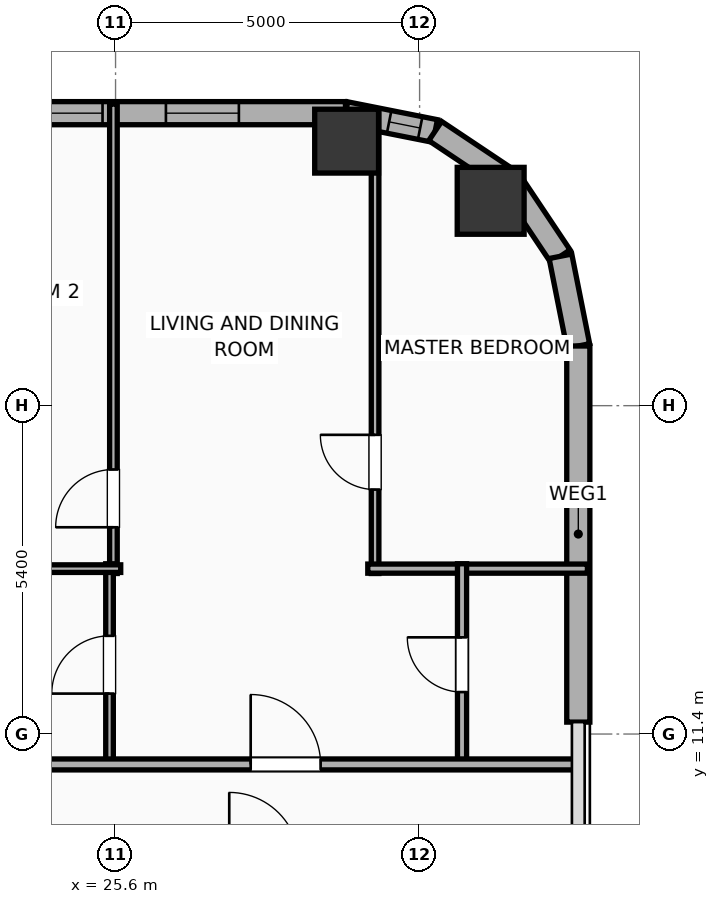
"""IFC4 building model, lengths in metres.
Left out: names, types, materials, properties, quantities, classifications, styles, units other than length and angle.
Written with IfcOpenShell. Run it as: python <this file> out.ifc"""

import sys

from ifc_helpers import new_model, si_unit, direction, frame, frame_2d, origin, origin_2d, place, context, subcontext, project, spatial, rectangle, hollow_rectangle, hollow_circle, extrude, element, fill, save


model = new_model("IFC4")
c1 = context("Model", 3, precision=1e-05, world=origin(), true_north=direction((0.0, 1.0)))
c2 = subcontext(c1, "Body", "Model", "MODEL_VIEW")
j1 = project(units=[si_unit("LENGTHUNIT", "METRE"), si_unit("PLANEANGLEUNIT", "RADIAN")], contexts=[c1])
p1 = place(None, origin())
s1 = spatial("IfcSite", under=j1, at=p1, CompositionType="ELEMENT")
p2 = place(p1, origin())
s2 = spatial("IfcBuilding", under=s1, at=p2, CompositionType="ELEMENT")
p3 = place(p2, frame((0.0, 0.0, 89.7)))
s3 = spatial("IfcBuildingStorey", under=s2, at=p3, CompositionType="ELEMENT", Elevation=89.7)
p4 = place(p3, frame((31.769, 20.169, 0.0), z_axis=(0.0, 0.0, 1.0), x_axis=(1.0, 0.0, 0.0)))
e1 = element("IfcColumn", 1, at=p4, inside=s3, PredefinedType="COLUMN", context=c2, shape_type="SweptSolid", body=[
    extrude(hollow_circle(Radius=0.55, WallThickness=0.036, at=origin_2d()), origin(), (0.0, 0.0, 1.0), 3.9),
])
p5 = place(p3, frame((29.4, 21.15, 0.0), z_axis=(0.0, 0.0, 1.0), x_axis=(1.0, 0.0, 0.0)))
e2 = element("IfcColumn", 2, at=p5, inside=s3, PredefinedType="COLUMN", context=c2, shape_type="SweptSolid", body=[
    extrude(hollow_rectangle(XDim=1.05, YDim=1.05, WallThickness=0.036, at=origin_2d()), origin(), (0.0, 0.0, 1.0), 3.9),
])
p6 = place(p3, frame((-25.381, 21.61, 0.0), z_axis=(0.0, 0.0, 1.0), x_axis=(1.0, 0.0, 0.0)))
e3 = element("IfcWall", 3, at=p6, inside=s3, PredefinedType="ELEMENTEDWALL", context=c2, shape_type="SweptSolid", body=[
    extrude(rectangle(XDim=54.763, YDim=0.38, at=frame_2d((27.381, 0.0))), origin(), (0.0, 0.0, 1.0), 2.54),
])
p7 = place(p6, frame((6.495, 0.0, 0.75)))
e4 = element("IfcOpeningElement", 4, at=p7, cuts=e3, PredefinedType="OPENING", context=c2, shape_type="SweptSolid", body=[
    extrude(rectangle(XDim=2.4, YDim=1.63, at=frame_2d((1.2, 0.815))), frame((0.0, 0.2, 0.0), z_axis=(0.0, -1.0, 0.0), x_axis=(1.0, 0.0, 0.0)), (0.0, 0.0, 1.0), 0.4),
])
p8 = place(p6, frame((48.367, 0.0, 0.75)))
e5 = element("IfcOpeningElement", 5, at=p8, cuts=e3, PredefinedType="OPENING", context=c2, shape_type="SweptSolid", body=[
    extrude(rectangle(XDim=2.4, YDim=1.63, at=frame_2d((1.2, 0.815))), frame((0.0, 0.2, 0.0), z_axis=(0.0, -1.0, 0.0), x_axis=(1.0, 0.0, 0.0)), (0.0, 0.0, 1.0), 0.4),
])
p9 = place(p6, frame((1.231, 0.0, 0.75)))
e6 = element("IfcOpeningElement", 6, at=p9, cuts=e3, PredefinedType="OPENING", context=c2, shape_type="SweptSolid", body=[
    extrude(rectangle(XDim=1.2, YDim=1.63, at=frame_2d((0.6, 0.815))), frame((0.0, 0.2, 0.0), z_axis=(0.0, -1.0, 0.0), x_axis=(1.0, 0.0, 0.0)), (0.0, 0.0, 1.0), 0.4),
])
p10 = place(p6, frame((3.772, 0.0, 0.75)))
e7 = element("IfcOpeningElement", 7, at=p10, cuts=e3, PredefinedType="OPENING", context=c2, shape_type="SweptSolid", body=[
    extrude(rectangle(XDim=1.2, YDim=1.63, at=frame_2d((0.6, 0.815))), frame((0.0, 0.2, 0.0), z_axis=(0.0, -1.0, 0.0), x_axis=(1.0, 0.0, 0.0)), (0.0, 0.0, 1.0), 0.4),
])
p11 = place(p6, frame((12.031, 0.0, 0.75)))
e8 = element("IfcOpeningElement", 8, at=p11, cuts=e3, PredefinedType="OPENING", context=c2, shape_type="SweptSolid", body=[
    extrude(rectangle(XDim=1.2, YDim=1.63, at=frame_2d((0.6, 0.815))), frame((0.0, 0.2, 0.0), z_axis=(0.0, -1.0, 0.0), x_axis=(1.0, 0.0, 0.0)), (0.0, 0.0, 1.0), 0.4),
])
p12 = place(p6, frame((19.805, 0.0, 0.75)))
e9 = element("IfcOpeningElement", 9, at=p12, cuts=e3, PredefinedType="OPENING", context=c2, shape_type="SweptSolid", body=[
    extrude(rectangle(XDim=1.2, YDim=1.63, at=frame_2d((0.6, 0.815))), frame((0.0, 0.2, 0.0), z_axis=(0.0, -1.0, 0.0), x_axis=(1.0, 0.0, 0.0)), (0.0, 0.0, 1.0), 0.4),
])
p13 = place(p6, frame((16.555, 0.0, 0.75)))
e10 = element("IfcOpeningElement", 10, at=p13, cuts=e3, PredefinedType="OPENING", context=c2, shape_type="SweptSolid", body=[
    extrude(rectangle(XDim=1.2, YDim=1.63, at=frame_2d((0.6, 0.815))), frame((0.0, 0.2, 0.0), z_axis=(0.0, -1.0, 0.0), x_axis=(1.0, 0.0, 0.0)), (0.0, 0.0, 1.0), 0.4),
])
p14 = place(p6, frame((23.866, 0.0, 0.75)))
e11 = element("IfcOpeningElement", 11, at=p14, cuts=e3, PredefinedType="OPENING", context=c2, shape_type="SweptSolid", body=[
    extrude(rectangle(XDim=1.2, YDim=1.63, at=frame_2d((0.6, 0.815))), frame((0.0, 0.2, 0.0), z_axis=(0.0, -1.0, 0.0), x_axis=(1.0, 0.0, 0.0)), (0.0, 0.0, 1.0), 0.4),
])
p15 = place(p6, frame((27.116, 0.0, 0.75)))
e12 = element("IfcOpeningElement", 12, at=p15, cuts=e3, PredefinedType="OPENING", context=c2, shape_type="SweptSolid", body=[
    extrude(rectangle(XDim=1.2, YDim=1.63, at=frame_2d((0.6, 0.815))), frame((0.0, 0.2, 0.0), z_axis=(0.0, -1.0, 0.0), x_axis=(1.0, 0.0, 0.0)), (0.0, 0.0, 1.0), 0.4),
])
p16 = place(p6, frame((30.931, 0.0, 0.75)))
e13 = element("IfcOpeningElement", 13, at=p16, cuts=e3, PredefinedType="OPENING", context=c2, shape_type="SweptSolid", body=[
    extrude(rectangle(XDim=1.2, YDim=1.63, at=frame_2d((0.6, 0.815))), frame((0.0, 0.2, 0.0), z_axis=(0.0, -1.0, 0.0), x_axis=(1.0, 0.0, 0.0)), (0.0, 0.0, 1.0), 0.4),
])
p17 = place(p6, frame((36.733, 0.0, 0.75)))
e14 = element("IfcOpeningElement", 14, at=p17, cuts=e3, PredefinedType="OPENING", context=c2, shape_type="SweptSolid", body=[
    extrude(rectangle(XDim=1.2, YDim=1.63, at=frame_2d((0.6, 0.815))), frame((0.0, 0.2, 0.0), z_axis=(0.0, -1.0, 0.0), x_axis=(1.0, 0.0, 0.0)), (0.0, 0.0, 1.0), 0.4),
])
p18 = place(p6, frame((39.858, 0.0, 0.75)))
e15 = element("IfcOpeningElement", 15, at=p18, cuts=e3, PredefinedType="OPENING", context=c2, shape_type="SweptSolid", body=[
    extrude(rectangle(XDim=1.2, YDim=1.63, at=frame_2d((0.6, 0.815))), frame((0.0, 0.2, 0.0), z_axis=(0.0, -1.0, 0.0), x_axis=(1.0, 0.0, 0.0)), (0.0, 0.0, 1.0), 0.4),
])
p19 = place(p6, frame((44.636, 0.0, 0.75)))
e16 = element("IfcOpeningElement", 16, at=p19, cuts=e3, PredefinedType="OPENING", context=c2, shape_type="SweptSolid", body=[
    extrude(rectangle(XDim=1.2, YDim=1.63, at=frame_2d((0.6, 0.815))), frame((0.0, 0.2, 0.0), z_axis=(0.0, -1.0, 0.0), x_axis=(1.0, 0.0, 0.0)), (0.0, 0.0, 1.0), 0.4),
])
p20 = place(p6, frame((51.809, 0.0, 0.75)))
e17 = element("IfcOpeningElement", 17, at=p20, cuts=e3, PredefinedType="OPENING", context=c2, shape_type="SweptSolid", body=[
    extrude(rectangle(XDim=1.2, YDim=1.63, at=frame_2d((0.6, 0.815))), frame((0.0, 0.2, 0.0), z_axis=(0.0, -1.0, 0.0), x_axis=(1.0, 0.0, 0.0)), (0.0, 0.0, 1.0), 0.4),
])
p21 = place(p3, frame((29.381, 21.61, 0.0), z_axis=(0.0, 0.0, 1.0), x_axis=(0.980755066645, -0.195242155415, 0.0)))
e18 = element("IfcWall", 18, at=p21, inside=s3, PredefinedType="ELEMENTEDWALL", context=c2, shape_type="SweptSolid", body=[
    extrude(rectangle(XDim=1.504, YDim=0.38, at=frame_2d((0.752, 0.0))), origin(), (0.0, 0.0, 1.0), 2.54),
])
p22 = place(p21, frame((0.732, 0.0, 0.75)))
e19 = element("IfcOpeningElement", 19, at=p22, cuts=e18, PredefinedType="OPENING", context=c2, shape_type="SweptSolid", body=[
    extrude(rectangle(XDim=0.52, YDim=1.63, at=frame_2d((0.26, 0.815))), frame((0.0, 0.2, 0.0), z_axis=(0.0, -1.0, 0.0), x_axis=(1.0, 0.0, 0.0)), (0.0, 0.0, 1.0), 0.4),
])
p23 = place(p3, frame((30.857, 21.316, 0.0), z_axis=(0.0, 0.0, 1.0), x_axis=(0.831468045563, -0.555572577804, 0.0)))
e20 = element("IfcWall", 20, at=p23, inside=s3, PredefinedType="ELEMENTEDWALL", context=c2, shape_type="SweptSolid", body=[
    extrude(rectangle(XDim=1.485, YDim=0.38, at=frame_2d((0.742, 0.0))), origin(), (0.0, 0.0, 1.0), 2.54),
])
p24 = place(p3, frame((32.091, 20.491, 0.0), z_axis=(0.0, 0.0, 1.0), x_axis=(0.555610286119, -0.831442848281, 0.0)))
e21 = element("IfcWall", 21, at=p24, inside=s3, PredefinedType="ELEMENTEDWALL", context=c2, shape_type="SweptSolid", body=[
    extrude(rectangle(XDim=1.485, YDim=0.38, at=frame_2d((0.743, 0.0))), origin(), (0.0, 0.0, 1.0), 3.65),
])
p25 = place(p3, frame((32.917, 19.257, 0.0), z_axis=(0.0, 0.0, 1.0), x_axis=(0.195086038585, -0.980786132421, 0.0)))
e22 = element("IfcWall", 22, at=p25, inside=s3, PredefinedType="ELEMENTEDWALL", context=c2, shape_type="SweptSolid", body=[
    extrude(rectangle(XDim=1.504, YDim=0.38, at=frame_2d((0.752, 0.0))), origin(), (0.0, 0.0, 1.0), 3.65),
])
p26 = place(p3, frame((33.21, 17.781, 0.0), z_axis=(0.0, 0.0, 1.0), x_axis=(0.0, -1.0, 0.0)))
e23 = element("IfcWall", 23, at=p26, inside=s3, PredefinedType="ELEMENTEDWALL", context=c2, shape_type="SweptSolid", body=[
    extrude(rectangle(XDim=6.185, YDim=0.38, at=frame_2d((3.093, 0.0))), origin(), (0.0, 0.0, 1.0), 2.54),
])
p27 = place(p3, frame((25.565, 14.04, 0.0), z_axis=(0.0, 0.0, 1.0), x_axis=(0.0, 1.0, 0.0)))
e24 = element("IfcWall", 24, at=p27, inside=s3, PredefinedType="PARTITIONING", context=c2, shape_type="SweptSolid", body=[
    extrude(rectangle(XDim=7.72, YDim=0.125, at=frame_2d((3.86, 0.0))), origin(), (0.0, 0.0, 1.0), 3.65),
])
p28 = place(p27, frame((0.76, 0.0, 0.0)))
e25 = element("IfcOpeningElement", 25, at=p28, cuts=e24, PredefinedType="OPENING", context=c2, shape_type="SweptSolid", body=[
    extrude(rectangle(XDim=0.95, YDim=2.05, at=frame_2d((0.475, 1.025))), frame((0.0, 0.073, 0.0), z_axis=(0.0, -1.0, 0.0), x_axis=(1.0, 0.0, 0.0)), (0.0, 0.0, 1.0), 0.145),
])
p29 = place(p3, frame((29.868, 14.04, 0.0), z_axis=(0.0, 0.0, 1.0), x_axis=(0.0, 1.0, 0.0)))
e26 = element("IfcWall", 26, at=p29, inside=s3, PredefinedType="PARTITIONING", context=c2, shape_type="SweptSolid", body=[
    extrude(rectangle(XDim=7.626, YDim=0.125, at=frame_2d((3.813, 0.0))), origin(), (0.0, 0.0, 1.0), 3.65),
])
p30 = place(p29, frame((1.38, 0.0, 0.0)))
e27 = element("IfcOpeningElement", 27, at=p30, cuts=e26, PredefinedType="OPENING", context=c2, shape_type="SweptSolid", body=[
    extrude(rectangle(XDim=0.9, YDim=2.05, at=frame_2d((0.45, 1.025))), frame((0.0, 0.073, 0.0), z_axis=(0.0, -1.0, 0.0), x_axis=(1.0, 0.0, 0.0)), (0.0, 0.0, 1.0), 0.145),
])
p31 = place(p3, frame((29.748, 14.12, 0.0), z_axis=(0.0, 0.0, 1.0), x_axis=(1.0, 0.0, 0.0)))
e28 = element("IfcWall", 28, at=p31, inside=s3, PredefinedType="PLUMBINGWALL", context=c2, shape_type="SweptSolid", body=[
    extrude(rectangle(XDim=3.612, YDim=0.15, at=frame_2d((1.806, 0.0))), origin(), (0.0, 0.0, 1.0), 3.65),
])
p32 = place(p3, frame((25.501, 10.88, 0.0), z_axis=(0.0, 0.0, 1.0), x_axis=(0.0, 1.0, 0.0)))
e29 = element("IfcWall", 29, at=p32, inside=s3, PredefinedType="PARTITIONING", context=c2, shape_type="SweptSolid", body=[
    extrude(rectangle(XDim=3.32, YDim=0.125, at=frame_2d((1.66, 0.0))), origin(), (0.0, 0.0, 1.0), 3.65),
])
p33 = place(p32, frame((1.185, 0.0, 0.0)))
e30 = element("IfcOpeningElement", 30, at=p33, cuts=e29, PredefinedType="OPENING", context=c2, shape_type="SweptSolid", body=[
    extrude(rectangle(XDim=0.95, YDim=2.05, at=frame_2d((0.475, 1.025))), frame((0.0, 0.073, 0.0), z_axis=(0.0, -1.0, 0.0), x_axis=(1.0, 0.0, 0.0)), (0.0, 0.0, 1.0), 0.145),
])
p34 = place(p3, frame((22.24, 14.12, 0.0), z_axis=(0.0, 0.0, 1.0), x_axis=(1.0, 0.0, 0.0)))
e31 = element("IfcWall", 31, at=p34, inside=s3, PredefinedType="PARTITIONING", context=c2, shape_type="SweptSolid", body=[
    extrude(rectangle(XDim=3.445, YDim=0.125, at=frame_2d((1.723, 0.0))), origin(), (0.0, 0.0, 1.0), 3.65),
])
p35 = place(p3, frame((31.298, 10.88, 0.0), z_axis=(0.0, 0.0, 1.0), x_axis=(0.0, 1.0, 0.0)))
e32 = element("IfcWall", 32, at=p35, inside=s3, PredefinedType="PLUMBINGWALL", context=c2, shape_type="SweptSolid", body=[
    extrude(rectangle(XDim=3.32, YDim=0.15, at=frame_2d((1.66, 0.0))), origin(), (0.0, 0.0, 1.0), 3.65),
])
p36 = place(p35, frame((1.21, 0.0, 0.0)))
e33 = element("IfcOpeningElement", 33, at=p36, cuts=e32, PredefinedType="OPENING", context=c2, shape_type="SweptSolid", body=[
    extrude(rectangle(XDim=0.9, YDim=2.05, at=frame_2d((0.45, 1.025))), frame((0.0, 0.085, 0.0), z_axis=(0.0, -1.0, 0.0), x_axis=(1.0, 0.0, 0.0)), (0.0, 0.0, 1.0), 0.17),
])
p37 = place(p3, frame((-29.21, 10.9, 0.0), z_axis=(0.0, 0.0, 1.0), x_axis=(1.0, 0.0, 0.0)))
e34 = element("IfcWall", 34, at=p37, inside=s3, PredefinedType="PARTITIONING", context=c2, shape_type="SweptSolid", body=[
    extrude(rectangle(XDim=62.42, YDim=0.18, at=frame_2d((31.21, 0.0))), origin(), (0.0, 0.0, 1.0), 3.65),
])
p38 = place(p37, frame((2.983, 0.0, 0.0)))
e35 = element("IfcOpeningElement", 35, at=p38, cuts=e34, PredefinedType="OPENING", context=c2, shape_type="SweptSolid", body=[
    extrude(rectangle(XDim=0.9, YDim=2.05, at=frame_2d((0.45, 1.025))), frame((0.0, 0.1, 0.0), z_axis=(0.0, -1.0, 0.0), x_axis=(1.0, 0.0, 0.0)), (0.0, 0.0, 1.0), 0.2),
])
p39 = place(p37, frame((9.618, 0.0, 0.0)))
e36 = element("IfcOpeningElement", 36, at=p39, cuts=e34, PredefinedType="OPENING", context=c2, shape_type="SweptSolid", body=[
    extrude(rectangle(XDim=0.9, YDim=2.05, at=frame_2d((0.45, 1.025))), frame((0.0, 0.1, 0.0), z_axis=(0.0, -1.0, 0.0), x_axis=(1.0, 0.0, 0.0)), (0.0, 0.0, 1.0), 0.2),
])
p40 = place(p37, frame((16.135, 0.0, 0.0)))
e37 = element("IfcOpeningElement", 37, at=p40, cuts=e34, PredefinedType="OPENING", context=c2, shape_type="SweptSolid", body=[
    extrude(rectangle(XDim=0.9, YDim=2.05, at=frame_2d((0.45, 1.025))), frame((0.0, 0.1, 0.0), z_axis=(0.0, -1.0, 0.0), x_axis=(1.0, 0.0, 0.0)), (0.0, 0.0, 1.0), 0.2),
])
p41 = place(p37, frame((23.632, 0.0, 0.0)))
e38 = element("IfcOpeningElement", 38, at=p41, cuts=e34, PredefinedType="OPENING", context=c2, shape_type="SweptSolid", body=[
    extrude(rectangle(XDim=1.15, YDim=2.05, at=frame_2d((0.575, 1.025))), frame((0.0, 0.1, 0.0), z_axis=(0.0, -1.0, 0.0), x_axis=(1.0, 0.0, 0.0)), (0.0, 0.0, 1.0), 0.2),
])
p42 = place(p37, frame((27.751, 0.0, 0.0)))
e39 = element("IfcOpeningElement", 39, at=p42, cuts=e34, PredefinedType="OPENING", context=c2, shape_type="SweptSolid", body=[
    extrude(rectangle(XDim=1.15, YDim=2.05, at=frame_2d((0.575, 1.025))), frame((0.0, 0.1, 0.0), z_axis=(0.0, -1.0, 0.0), x_axis=(1.0, 0.0, 0.0)), (0.0, 0.0, 1.0), 0.2),
])
p43 = place(p37, frame((35.635, 0.0, 0.0)))
e40 = element("IfcOpeningElement", 40, at=p43, cuts=e34, PredefinedType="OPENING", context=c2, shape_type="SweptSolid", body=[
    extrude(rectangle(XDim=0.9, YDim=2.05, at=frame_2d((0.45, 1.025))), frame((0.0, 0.1, 0.0), z_axis=(0.0, -1.0, 0.0), x_axis=(1.0, 0.0, 0.0)), (0.0, 0.0, 1.0), 0.2),
])
p44 = place(p37, frame((40.616, 0.0, 0.0)))
e41 = element("IfcOpeningElement", 41, at=p44, cuts=e34, PredefinedType="OPENING", context=c2, shape_type="SweptSolid", body=[
    extrude(rectangle(XDim=1.15, YDim=2.05, at=frame_2d((0.575, 1.025))), frame((0.0, 0.1, 0.0), z_axis=(0.0, -1.0, 0.0), x_axis=(1.0, 0.0, 0.0)), (0.0, 0.0, 1.0), 0.2),
])
p45 = place(p37, frame((48.256, 0.0, 0.0)))
e42 = element("IfcOpeningElement", 42, at=p45, cuts=e34, PredefinedType="OPENING", context=c2, shape_type="SweptSolid", body=[
    extrude(rectangle(XDim=0.9, YDim=2.05, at=frame_2d((0.45, 1.025))), frame((0.0, 0.1, 0.0), z_axis=(0.0, -1.0, 0.0), x_axis=(1.0, 0.0, 0.0)), (0.0, 0.0, 1.0), 0.2),
])
p46 = place(p37, frame((57.032, 0.0, 0.0)))
e43 = element("IfcOpeningElement", 43, at=p46, cuts=e34, PredefinedType="OPENING", context=c2, shape_type="SweptSolid", body=[
    extrude(rectangle(XDim=1.15, YDim=2.05, at=frame_2d((0.575, 1.025))), frame((0.0, 0.1, 0.0), z_axis=(0.0, -1.0, 0.0), x_axis=(1.0, 0.0, 0.0)), (0.0, 0.0, 1.0), 0.2),
])
p47 = place(p8, origin())
e44 = element("IfcWindow", 44, at=p47, inside=s3, PartitioningType="SINGLE_PANEL", PredefinedType="WINDOW", context=c2, shape_type="SweptSolid", body=[
    extrude(rectangle(XDim=2.4, YDim=1.63, at=frame_2d((1.2, 0.815))), frame((0.0, 0.03, 0.0), z_axis=(0.0, -1.0, 0.0), x_axis=(1.0, 0.0, 0.0)), (0.0, 0.0, 1.0), 0.06),
])
fill(e5, e44)
p48 = place(p20, origin())
e45 = element("IfcWindow", 45, at=p48, inside=s3, PartitioningType="SINGLE_PANEL", PredefinedType="WINDOW", context=c2, shape_type="SweptSolid", body=[
    extrude(rectangle(XDim=1.2, YDim=1.63, at=frame_2d((0.6, 0.815))), frame((0.0, 0.03, 0.0), z_axis=(0.0, -1.0, 0.0), x_axis=(1.0, 0.0, 0.0)), (0.0, 0.0, 1.0), 0.06),
])
fill(e17, e45)
p49 = place(p22, origin())
e46 = element("IfcWindow", 46, at=p49, inside=s3, PartitioningType="SINGLE_PANEL", PredefinedType="WINDOW", context=c2, shape_type="SweptSolid", body=[
    extrude(rectangle(XDim=0.52, YDim=1.63, at=frame_2d((0.26, 0.815))), frame((0.0, 0.03, 0.0), z_axis=(0.0, -1.0, 0.0), x_axis=(1.0, 0.0, 0.0)), (0.0, 0.0, 1.0), 0.06),
])
fill(e19, e46)
p50 = place(p28, origin())
e47 = element("IfcDoor", 47, at=p50, inside=s3, OperationType="SINGLE_SWING_LEFT", PredefinedType="DOOR", context=c2, shape_type="SweptSolid", body=[
    extrude(rectangle(XDim=0.95, YDim=2.05, at=frame_2d((0.475, 1.025))), frame((0.0, 0.025, 0.0), z_axis=(0.0, -1.0, 0.0), x_axis=(1.0, 0.0, 0.0)), (0.0, 0.0, 1.0), 0.05),
])
fill(e25, e47)
p51 = place(p30, origin())
e48 = element("IfcDoor", 48, at=p51, inside=s3, OperationType="SINGLE_SWING_RIGHT", PredefinedType="DOOR", context=c2, shape_type="SweptSolid", body=[
    extrude(rectangle(XDim=0.9, YDim=2.05, at=frame_2d((0.45, 1.025))), frame((0.0, 0.025, 0.0), z_axis=(0.0, -1.0, 0.0), x_axis=(1.0, 0.0, 0.0)), (0.0, 0.0, 1.0), 0.05),
])
fill(e27, e48)
p52 = place(p33, origin())
e49 = element("IfcDoor", 49, at=p52, inside=s3, OperationType="SINGLE_SWING_LEFT", PredefinedType="DOOR", context=c2, shape_type="SweptSolid", body=[
    extrude(rectangle(XDim=0.95, YDim=2.05, at=frame_2d((0.475, 1.025))), frame((0.0, 0.025, 0.0), z_axis=(0.0, -1.0, 0.0), x_axis=(1.0, 0.0, 0.0)), (0.0, 0.0, 1.0), 0.05),
])
fill(e30, e49)
p53 = place(p36, origin())
e50 = element("IfcDoor", 50, at=p53, inside=s3, OperationType="SINGLE_SWING_RIGHT", PredefinedType="DOOR", context=c2, shape_type="SweptSolid", body=[
    extrude(rectangle(XDim=0.9, YDim=2.05, at=frame_2d((0.45, 1.025))), frame((0.0, 0.025, 0.0), z_axis=(0.0, -1.0, 0.0), x_axis=(1.0, 0.0, 0.0)), (0.0, 0.0, 1.0), 0.05),
])
fill(e33, e50)
p54 = place(p46, origin())
e51 = element("IfcDoor", 51, at=p54, inside=s3, OperationType="SINGLE_SWING_LEFT", PredefinedType="DOOR", context=c2, shape_type="SweptSolid", body=[
    extrude(rectangle(XDim=1.15, YDim=2.05, at=frame_2d((0.575, 1.025))), frame((0.0, 0.025, 0.0), z_axis=(0.0, -1.0, 0.0), x_axis=(1.0, 0.0, 0.0)), (0.0, 0.0, 1.0), 0.05),
])
fill(e43, e51)
save(model, sys.argv[1])
